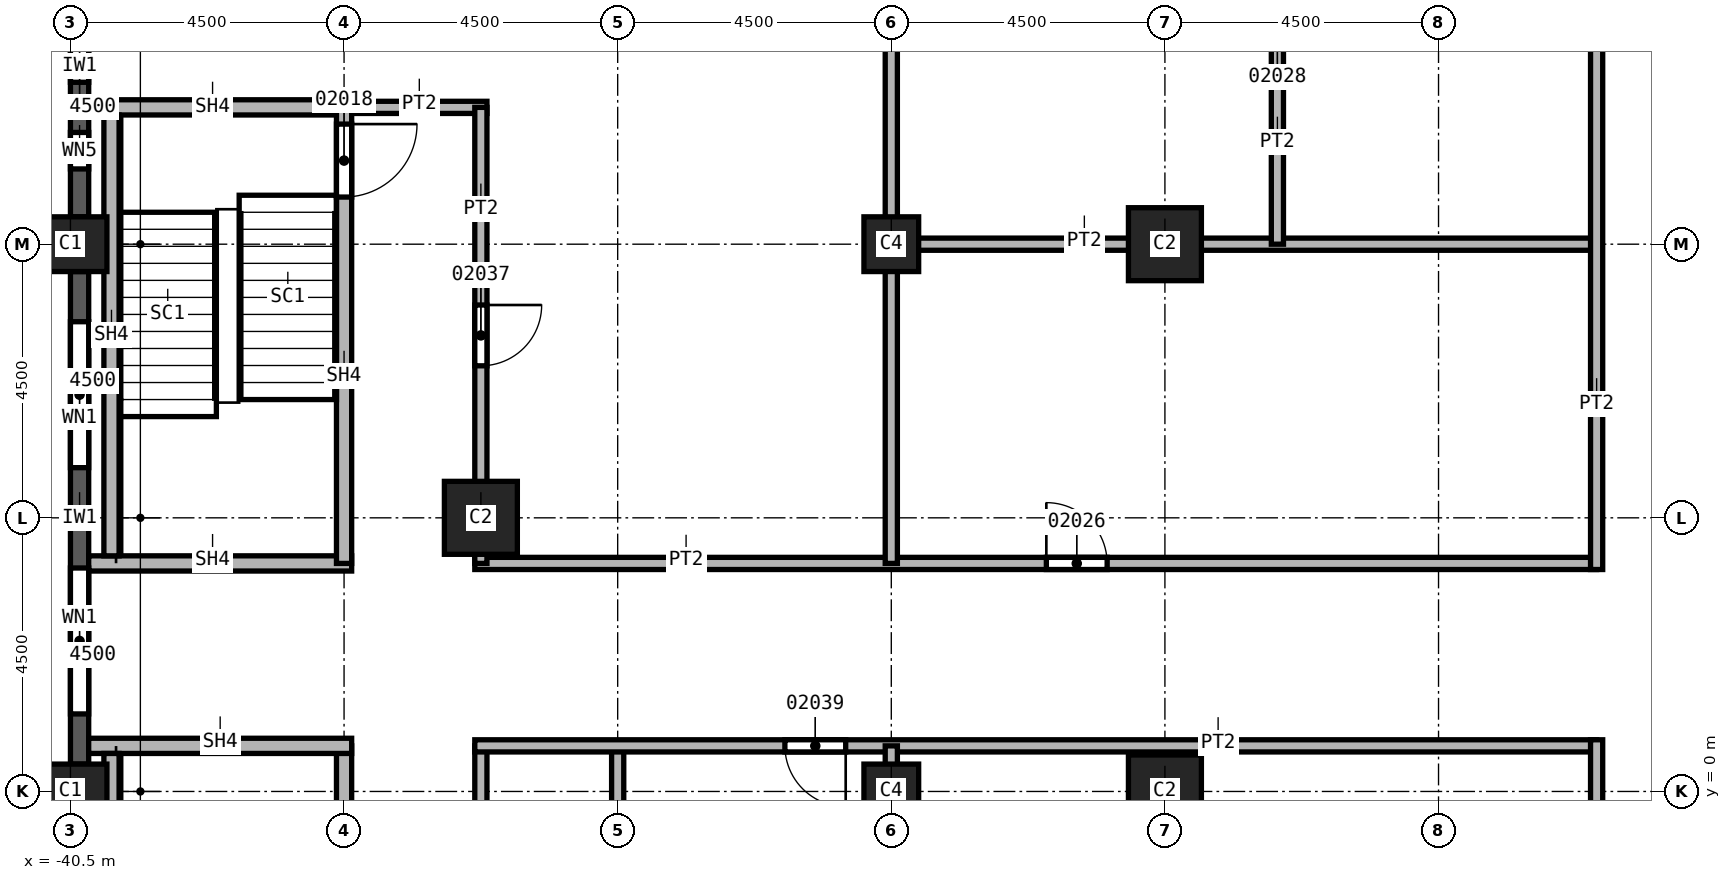
"""IFC4 building model, lengths in metres.
Left out: names, types, materials, properties, quantities, classifications, styles, units other than length and angle.
Written with IfcOpenShell. Run it as: python <this file> out.ifc"""

import sys

from ifc_helpers import new_model, si_unit, direction, frame, frame_2d, origin, origin_2d, place, context, subcontext, project, spatial, rectangle, extrude, element, fill, save


model = new_model("IFC4")
c1 = context("Model", 3, precision=1e-05, world=origin(), true_north=direction((0.0, 1.0)))
c2 = subcontext(c1, "Body", "Model", "MODEL_VIEW")
j1 = project(units=[si_unit("LENGTHUNIT", "METRE"), si_unit("PLANEANGLEUNIT", "RADIAN")], contexts=[c1])
p1 = place(None, origin())
s1 = spatial("IfcSite", under=j1, at=p1, CompositionType="ELEMENT")
p2 = place(p1, origin())
s2 = spatial("IfcBuilding", under=s1, at=p2, CompositionType="ELEMENT")
p3 = place(p2, frame((0.0, 0.0, 80.0)))
s3 = spatial("IfcBuildingStorey", under=s2, at=p3, CompositionType="ELEMENT", Elevation=80.0)
for number, where, z_axis, x_axis in (
    (1, (-40.5, 0.0, 0.0), (0.0, 0.0, 1.0), (0.0, 1.0, 0.0)),
    (2, (-40.5, 9.0, 0.0), (0.0, 0.0, 1.0), (0.0, 1.0, 0.0)),
):
    element("IfcColumn", number, at=place(p3, frame(where, z_axis=z_axis, x_axis=x_axis)), inside=s3, PredefinedType="COLUMN", context=c2, shape_type="SweptSolid", body=[
        extrude(rectangle(XDim=0.9, YDim=1.2, at=origin_2d()), origin(), (0.0, 0.0, 1.0), 3.7),
    ])
for number, where, z_axis, x_axis in (
    (3, (-33.75, 4.5, 0.0), (0.0, 0.0, 1.0), (1.0, 0.0, 0.0)),
    (4, (-22.5, 0.0, 0.0), (0.0, 0.0, 1.0), (1.0, 0.0, 0.0)),
    (5, (-22.5, 9.0, 0.0), (0.0, 0.0, 1.0), (1.0, 0.0, 0.0)),
):
    element("IfcColumn", number, at=place(p3, frame(where, z_axis=z_axis, x_axis=x_axis)), inside=s3, PredefinedType="COLUMN", context=c2, shape_type="SweptSolid", body=[
        extrude(rectangle(XDim=1.2, YDim=1.2, at=origin_2d()), origin(), (0.0, 0.0, 1.0), 3.7),
    ])
for number, where, z_axis, x_axis in (
    (6, (-27.0, 0.0, 0.0), (0.0, 0.0, 1.0), (1.0, 0.0, 0.0)),
    (7, (-27.0, 9.0, 0.0), (0.0, 0.0, 1.0), (1.0, 0.0, 0.0)),
):
    element("IfcColumn", number, at=place(p3, frame(where, z_axis=z_axis, x_axis=x_axis)), inside=s3, PredefinedType="COLUMN", context=c2, shape_type="SweptSolid", body=[
        extrude(rectangle(XDim=0.9, YDim=0.9, at=origin_2d()), origin(), (0.0, 0.0, 1.0), 3.7),
    ])
p4 = place(p3, frame((-40.35, 13.05, 0.0), z_axis=(0.0, 0.0, 1.0), x_axis=(0.0, -1.0, 0.0)))
e8 = element("IfcWall", 8, at=p4, inside=s3, PredefinedType="SOLIDWALL", context=c2, shape_type="SweptSolid", body=[
    extrude(rectangle(XDim=3.6, YDim=0.3, at=frame_2d((1.8, 0.0))), origin(), (0.0, 0.0, 1.0), 3.1),
])
p5 = place(p4, frame((0.788, 0.0, 0.8)))
e9 = element("IfcOpeningElement", 9, at=p5, cuts=e8, PredefinedType="OPENING", context=c2, shape_type="SweptSolid", body=[
    extrude(rectangle(XDim=0.6, YDim=1.95, at=frame_2d((0.3, 0.975))), frame((0.0, 0.15, 0.0), z_axis=(0.0, -1.0, 0.0), x_axis=(1.0, 0.0, 0.0)), (0.0, 0.0, 1.0), 0.3),
])
p6 = place(p4, frame((2.212, 0.0, 0.8)))
e10 = element("IfcOpeningElement", 10, at=p6, cuts=e8, PredefinedType="OPENING", context=c2, shape_type="SweptSolid", body=[
    extrude(rectangle(XDim=0.6, YDim=1.95, at=frame_2d((0.3, 0.975))), frame((0.0, 0.15, 0.0), z_axis=(0.0, -1.0, 0.0), x_axis=(1.0, 0.0, 0.0)), (0.0, 0.0, 1.0), 0.3),
])
p7 = place(p3, frame((-40.35, 8.55, 0.0), z_axis=(0.0, 0.0, 1.0), x_axis=(0.0, -1.0, 0.0)))
e11 = element("IfcWall", 11, at=p7, inside=s3, PredefinedType="SOLIDWALL", context=c2, shape_type="SweptSolid", body=[
    extrude(rectangle(XDim=8.1, YDim=0.3, at=frame_2d((4.05, 0.0))), origin(), (0.0, 0.0, 1.0), 3.1),
])
p8 = place(p7, frame((0.825, 0.0, 0.8)))
e12 = element("IfcOpeningElement", 12, at=p8, cuts=e11, PredefinedType="OPENING", context=c2, shape_type="SweptSolid", body=[
    extrude(rectangle(XDim=2.4, YDim=1.95, at=frame_2d((1.2, 0.975))), frame((0.0, 0.15, 0.0), z_axis=(0.0, -1.0, 0.0), x_axis=(1.0, 0.0, 0.0)), (0.0, 0.0, 1.0), 0.3),
])
p9 = place(p7, frame((4.875, 0.0, 0.8)))
e13 = element("IfcOpeningElement", 13, at=p9, cuts=e11, PredefinedType="OPENING", context=c2, shape_type="SweptSolid", body=[
    extrude(rectangle(XDim=2.4, YDim=1.95, at=frame_2d((1.2, 0.975))), frame((0.0, 0.15, 0.0), z_axis=(0.0, -1.0, 0.0), x_axis=(1.0, 0.0, 0.0)), (0.0, 0.0, 1.0), 0.3),
])
p10 = place(p3, frame((-36.0, 11.25, 0.0), z_axis=(0.0, 0.0, 1.0), x_axis=(1.0, 0.0, 0.0)))
e14 = element("IfcWall", 14, at=p10, inside=s3, PredefinedType="PARTITIONING", context=c2, shape_type="SweptSolid", body=[
    extrude(rectangle(XDim=2.35, YDim=0.2, at=frame_2d((1.175, 0.0))), origin(), (0.0, 0.0, 1.0), 3.7),
])
p11 = place(p3, frame((-33.85, 3.75, 0.0), z_axis=(0.0, 0.0, 1.0), x_axis=(1.0, 0.0, 0.0)))
e15 = element("IfcWall", 15, at=p11, inside=s3, PredefinedType="PARTITIONING", context=c2, shape_type="SweptSolid", body=[
    extrude(rectangle(XDim=18.45, YDim=0.2, at=frame_2d((9.225, 0.0))), origin(), (0.0, 0.0, 1.0), 3.7),
])
p12 = place(p11, frame((9.4, 0.0, 0.0)))
e16 = element("IfcOpeningElement", 16, at=p12, cuts=e15, PredefinedType="OPENING", context=c2, shape_type="SweptSolid", body=[
    extrude(rectangle(XDim=1.0, YDim=2.1, at=frame_2d((0.5, 1.05))), frame((0.0, 0.1, 0.0), z_axis=(0.0, -1.0, 0.0), x_axis=(1.0, 0.0, 0.0)), (0.0, 0.0, 1.0), 0.2),
])
p13 = place(p3, frame((-33.75, 0.75, 0.0), z_axis=(0.0, 0.0, 1.0), x_axis=(0.0, -1.0, 0.0)))
e17 = element("IfcWall", 17, at=p13, inside=s3, PredefinedType="PARTITIONING", context=c2, shape_type="SweptSolid", body=[
    extrude(rectangle(XDim=7.6, YDim=0.2, at=frame_2d((3.8, 0.0))), origin(), (0.0, 0.0, 1.0), 3.7),
])
p14 = place(p13, frame((2.35, 0.0, 0.0)))
e18 = element("IfcOpeningElement", 18, at=p14, cuts=e17, PredefinedType="OPENING", context=c2, shape_type="SweptSolid", body=[
    extrude(rectangle(XDim=1.0, YDim=2.1, at=frame_2d((0.5, 1.05))), frame((0.0, 0.1, 0.0), z_axis=(0.0, -1.0, 0.0), x_axis=(1.0, 0.0, 0.0)), (0.0, 0.0, 1.0), 0.2),
])
p15 = place(p3, frame((-33.75, 11.25, 0.0), z_axis=(0.0, 0.0, 1.0), x_axis=(0.0, -1.0, 0.0)))
e19 = element("IfcWall", 19, at=p15, inside=s3, PredefinedType="PARTITIONING", context=c2, shape_type="SweptSolid", body=[
    extrude(rectangle(XDim=7.5, YDim=0.2, at=frame_2d((3.75, 0.0))), origin(), (0.0, 0.0, 1.0), 3.7),
])
p16 = place(p15, frame((3.25, 0.0, 0.0)))
e20 = element("IfcOpeningElement", 20, at=p16, cuts=e19, PredefinedType="OPENING", context=c2, shape_type="SweptSolid", body=[
    extrude(rectangle(XDim=1.0, YDim=2.1, at=frame_2d((0.5, 1.05))), frame((0.0, 0.1, 0.0), z_axis=(0.0, -1.0, 0.0), x_axis=(1.0, 0.0, 0.0)), (0.0, 0.0, 1.0), 0.2),
])
p17 = place(p3, frame((-31.5, 0.75, 0.0), z_axis=(0.0, 0.0, 1.0), x_axis=(0.0, -1.0, 0.0)))
e21 = element("IfcWall", 21, at=p17, inside=s3, PredefinedType="PARTITIONING", context=c2, shape_type="SweptSolid", body=[
    extrude(rectangle(XDim=18.15, YDim=0.2, at=frame_2d((9.075, 0.0))), origin(), (0.0, 0.0, 1.0), 3.7),
])
p18 = place(p3, frame((-15.4, 0.75, 0.0), z_axis=(0.0, 0.0, 1.0), x_axis=(-1.0, 0.0, 0.0)))
e22 = element("IfcWall", 22, at=p18, inside=s3, PredefinedType="PARTITIONING", context=c2, shape_type="SweptSolid", body=[
    extrude(rectangle(XDim=18.45, YDim=0.2, at=frame_2d((9.225, 0.0))), origin(), (0.0, 0.0, 1.0), 3.7),
])
p19 = place(p18, frame((12.35, 0.0, 0.0)))
e23 = element("IfcOpeningElement", 23, at=p19, cuts=e22, PredefinedType="OPENING", context=c2, shape_type="SweptSolid", body=[
    extrude(rectangle(XDim=1.0, YDim=2.1, at=frame_2d((0.5, 1.05))), frame((0.0, 0.1, 0.0), z_axis=(0.0, -1.0, 0.0), x_axis=(1.0, 0.0, 0.0)), (0.0, 0.0, 1.0), 0.2),
])
p20 = place(p3, frame((-27.1, 9.0, 0.0), z_axis=(0.0, 0.0, 1.0), x_axis=(1.0, 0.0, 0.0)))
e24 = element("IfcWall", 24, at=p20, inside=s3, PredefinedType="PARTITIONING", context=c2, shape_type="SweptSolid", body=[
    extrude(rectangle(XDim=11.7, YDim=0.2, at=frame_2d((5.85, 0.0))), origin(), (0.0, 0.0, 1.0), 3.7),
])
p21 = place(p3, frame((-27.0, -17.4, 0.0), z_axis=(0.0, 0.0, 1.0), x_axis=(0.0, 1.0, 0.0)))
e25 = element("IfcWall", 25, at=p21, inside=s3, PredefinedType="PARTITIONING", context=c2, shape_type="SweptSolid", body=[
    extrude(rectangle(XDim=18.15, YDim=0.2, at=frame_2d((9.075, 0.0))), origin(), (0.0, 0.0, 1.0), 3.7),
])
p22 = place(p3, frame((-27.0, 3.75, 0.0), z_axis=(0.0, 0.0, 1.0), x_axis=(0.0, 1.0, 0.0)))
e26 = element("IfcWall", 26, at=p22, inside=s3, PredefinedType="PARTITIONING", context=c2, shape_type="SweptSolid", body=[
    extrude(rectangle(XDim=13.65, YDim=0.2, at=frame_2d((6.825, 0.0))), origin(), (0.0, 0.0, 1.0), 3.7),
])
p23 = place(p3, frame((-20.65, 9.0, 0.0), z_axis=(0.0, 0.0, 1.0), x_axis=(0.0, 1.0, 0.0)))
e27 = element("IfcWall", 27, at=p23, inside=s3, PredefinedType="PARTITIONING", context=c2, shape_type="SweptSolid", body=[
    extrude(rectangle(XDim=4.5, YDim=0.2, at=frame_2d((2.25, 0.0))), origin(), (0.0, 0.0, 1.0), 3.7),
])
p24 = place(p23, frame((3.25, 0.0, 0.0)))
e28 = element("IfcOpeningElement", 28, at=p24, cuts=e27, PredefinedType="OPENING", context=c2, shape_type="SweptSolid", body=[
    extrude(rectangle(XDim=1.0, YDim=2.1, at=frame_2d((0.5, 1.05))), frame((0.0, 0.1, 0.0), z_axis=(0.0, -1.0, 0.0), x_axis=(1.0, 0.0, 0.0)), (0.0, 0.0, 1.0), 0.2),
])
p25 = place(p3, frame((-15.4, -24.5, 0.0), z_axis=(0.0, 0.0, 1.0), x_axis=(0.0, 1.0, 0.0)))
e29 = element("IfcWall", 29, at=p25, inside=s3, PredefinedType="PARTITIONING", context=c2, shape_type="SweptSolid", body=[
    extrude(rectangle(XDim=25.35, YDim=0.2, at=frame_2d((12.675, 0.0))), origin(), (0.0, 0.0, 1.0), 3.7),
])
p26 = place(p25, frame((2.5, 0.0, 0.0)))
e30 = element("IfcOpeningElement", 30, at=p26, cuts=e29, PredefinedType="OPENING", context=c2, shape_type="SweptSolid", body=[
    extrude(rectangle(XDim=1.0, YDim=2.1, at=frame_2d((0.5, 1.05))), frame((0.0, 0.1, 0.0), z_axis=(0.0, -1.0, 0.0), x_axis=(1.0, 0.0, 0.0)), (0.0, 0.0, 1.0), 0.2),
])
p27 = place(p25, frame((5.875, 0.0, 0.0)))
e31 = element("IfcOpeningElement", 31, at=p27, cuts=e29, PredefinedType="OPENING", context=c2, shape_type="SweptSolid", body=[
    extrude(rectangle(XDim=1.0, YDim=2.1, at=frame_2d((0.5, 1.05))), frame((0.0, 0.1, 0.0), z_axis=(0.0, -1.0, 0.0), x_axis=(1.0, 0.0, 0.0)), (0.0, 0.0, 1.0), 0.2),
])
p28 = place(p25, frame((16.7, 0.0, 0.0)))
e32 = element("IfcOpeningElement", 32, at=p28, cuts=e29, PredefinedType="OPENING", context=c2, shape_type="SweptSolid", body=[
    extrude(rectangle(XDim=1.0, YDim=2.1, at=frame_2d((0.5, 1.05))), frame((0.0, 0.1, 0.0), z_axis=(0.0, -1.0, 0.0), x_axis=(1.0, 0.0, 0.0)), (0.0, 0.0, 1.0), 0.2),
])
p29 = place(p3, frame((-15.4, 3.65, 0.0), z_axis=(0.0, 0.0, 1.0), x_axis=(0.0, 1.0, 0.0)))
e33 = element("IfcWall", 33, at=p29, inside=s3, PredefinedType="PARTITIONING", context=c2, shape_type="SweptSolid", body=[
    extrude(rectangle(XDim=9.95, YDim=0.2, at=frame_2d((4.975, 0.0))), origin(), (0.0, 0.0, 1.0), 3.7),
])
p30 = place(p3, frame((-40.2, 3.75, 0.0), z_axis=(0.0, 0.0, 1.0), x_axis=(1.0, 0.0, 0.0)))
e34 = element("IfcWall", 34, at=p30, inside=s3, PredefinedType="SOLIDWALL", context=c2, shape_type="SweptSolid", body=[
    extrude(rectangle(XDim=4.325, YDim=0.25, at=frame_2d((2.163, 0.0))), origin(), (0.0, 0.0, 1.0), 3.7),
])
p31 = place(p3, frame((-40.2, 11.25, 0.0), z_axis=(0.0, 0.0, 1.0), x_axis=(1.0, 0.0, 0.0)))
e35 = element("IfcWall", 35, at=p31, inside=s3, PredefinedType="SOLIDWALL", context=c2, shape_type="SweptSolid", body=[
    extrude(rectangle(XDim=4.2, YDim=0.25, at=frame_2d((2.1, 0.0))), origin(), (0.0, 0.0, 1.0), 3.7),
])
p32 = place(p3, frame((-36.0, 0.75, 0.0), z_axis=(0.0, 0.0, 1.0), x_axis=(0.0, -1.0, 0.0)))
e36 = element("IfcWall", 36, at=p32, inside=s3, PredefinedType="SOLIDWALL", context=c2, shape_type="SweptSolid", body=[
    extrude(rectangle(XDim=7.625, YDim=0.25, at=frame_2d((3.812, 0.0))), origin(), (0.0, 0.0, 1.0), 3.7),
])
p33 = place(p32, frame((5.95, 0.0, 0.0)))
e37 = element("IfcOpeningElement", 37, at=p33, cuts=e36, PredefinedType="OPENING", context=c2, shape_type="SweptSolid", body=[
    extrude(rectangle(XDim=1.2, YDim=2.1, at=frame_2d((0.6, 1.05))), frame((0.0, 0.125, 0.0), z_axis=(0.0, -1.0, 0.0), x_axis=(1.0, 0.0, 0.0)), (0.0, 0.0, 1.0), 0.25),
])
p34 = place(p3, frame((-36.0, 11.375, 0.0), z_axis=(0.0, 0.0, 1.0), x_axis=(0.0, -1.0, 0.0)))
e38 = element("IfcWall", 38, at=p34, inside=s3, PredefinedType="SOLIDWALL", context=c2, shape_type="SweptSolid", body=[
    extrude(rectangle(XDim=7.625, YDim=0.25, at=frame_2d((3.812, 0.0))), origin(), (0.0, 0.0, 1.0), 3.7),
])
p35 = place(p34, frame((0.4, 0.0, 0.0)))
e39 = element("IfcOpeningElement", 39, at=p35, cuts=e38, PredefinedType="OPENING", context=c2, shape_type="SweptSolid", body=[
    extrude(rectangle(XDim=1.2, YDim=2.1, at=frame_2d((0.6, 1.05))), frame((0.0, 0.125, 0.0), z_axis=(0.0, -1.0, 0.0), x_axis=(1.0, 0.0, 0.0)), (0.0, 0.0, 1.0), 0.25),
])
p36 = place(p3, frame((-35.875, 0.75, 0.0), z_axis=(0.0, 0.0, 1.0), x_axis=(-1.0, 0.0, 0.0)))
e40 = element("IfcWall", 40, at=p36, inside=s3, PredefinedType="SOLIDWALL", context=c2, shape_type="SweptSolid", body=[
    extrude(rectangle(XDim=4.325, YDim=0.25, at=frame_2d((2.163, 0.0))), origin(), (0.0, 0.0, 1.0), 3.7),
])
for number, where, z_axis, x_axis in (
    (41, (-39.825, 3.875, 0.0), (0.0, 0.0, 1.0), (0.0, 1.0, 0.0)),
    (42, (-39.825, -6.625, 0.0), (0.0, 0.0, 1.0), (0.0, 1.0, 0.0)),
):
    element("IfcWall", number, at=place(p3, frame(where, z_axis=z_axis, x_axis=x_axis)), inside=s3, PredefinedType="SOLIDWALL", context=c2, shape_type="SweptSolid", body=[
        extrude(rectangle(XDim=7.25, YDim=0.25, at=frame_2d((3.625, 0.0))), origin(), (0.0, 0.0, 1.0), 3.7),
    ])
p37 = place(p8, origin())
e43 = element("IfcWindow", 43, at=p37, inside=s3, PartitioningType="SINGLE_PANEL", PredefinedType="WINDOW", context=c2, shape_type="SweptSolid", body=[
    extrude(rectangle(XDim=2.4, YDim=1.95, at=frame_2d((1.2, 0.975))), frame((0.0, 0.03, 0.0), z_axis=(0.0, -1.0, 0.0), x_axis=(1.0, 0.0, 0.0)), (0.0, 0.0, 1.0), 0.06),
])
fill(e12, e43)
p38 = place(p9, origin())
e44 = element("IfcWindow", 44, at=p38, inside=s3, PartitioningType="SINGLE_PANEL", PredefinedType="WINDOW", context=c2, shape_type="SweptSolid", body=[
    extrude(rectangle(XDim=2.4, YDim=1.95, at=frame_2d((1.2, 0.975))), frame((0.0, 0.03, 0.0), z_axis=(0.0, -1.0, 0.0), x_axis=(1.0, 0.0, 0.0)), (0.0, 0.0, 1.0), 0.06),
])
fill(e13, e44)
p39 = place(p35, origin())
e45 = element("IfcDoor", 45, at=p39, inside=s3, OperationType="SINGLE_SWING_LEFT", PredefinedType="DOOR", context=c2, shape_type="SweptSolid", body=[
    extrude(rectangle(XDim=1.2, YDim=2.1, at=frame_2d((0.6, 1.05))), frame((0.0, 0.025, 0.0), z_axis=(0.0, -1.0, 0.0), x_axis=(1.0, 0.0, 0.0)), (0.0, 0.0, 1.0), 0.05),
])
fill(e39, e45)
p40 = place(p12, origin())
e46 = element("IfcDoor", 46, at=p40, inside=s3, OperationType="SINGLE_SWING_LEFT", PredefinedType="DOOR", context=c2, shape_type="SweptSolid", body=[
    extrude(rectangle(XDim=1.0, YDim=2.1, at=frame_2d((0.5, 1.05))), frame((0.0, 0.025, 0.0), z_axis=(0.0, -1.0, 0.0), x_axis=(1.0, 0.0, 0.0)), (0.0, 0.0, 1.0), 0.05),
])
fill(e16, e46)
p41 = place(p16, origin())
e47 = element("IfcDoor", 47, at=p41, inside=s3, OperationType="SINGLE_SWING_RIGHT", PredefinedType="DOOR", context=c2, shape_type="SweptSolid", body=[
    extrude(rectangle(XDim=1.0, YDim=2.1, at=frame_2d((0.5, 1.05))), frame((0.0, 0.025, 0.0), z_axis=(0.0, -1.0, 0.0), x_axis=(1.0, 0.0, 0.0)), (0.0, 0.0, 1.0), 0.05),
])
fill(e20, e47)
p42 = place(p19, origin())
e48 = element("IfcDoor", 48, at=p42, inside=s3, OperationType="SINGLE_SWING_RIGHT", PredefinedType="DOOR", context=c2, shape_type="SweptSolid", body=[
    extrude(rectangle(XDim=1.0, YDim=2.1, at=frame_2d((0.5, 1.05))), frame((0.0, 0.025, 0.0), z_axis=(0.0, -1.0, 0.0), x_axis=(1.0, 0.0, 0.0)), (0.0, 0.0, 1.0), 0.05),
])
fill(e23, e48)
p43 = place(p5, origin())
e49 = element("IfcWindow", 49, at=p43, inside=s3, PartitioningType="SINGLE_PANEL", PredefinedType="WINDOW", context=c2, shape_type="SweptSolid", body=[
    extrude(rectangle(XDim=0.6, YDim=1.95, at=frame_2d((0.3, 0.975))), frame((0.0, 0.03, 0.0), z_axis=(0.0, -1.0, 0.0), x_axis=(1.0, 0.0, 0.0)), (0.0, 0.0, 1.0), 0.06),
])
fill(e9, e49)
p44 = place(p6, origin())
e50 = element("IfcWindow", 50, at=p44, inside=s3, PartitioningType="SINGLE_PANEL", PredefinedType="WINDOW", context=c2, shape_type="SweptSolid", body=[
    extrude(rectangle(XDim=0.6, YDim=1.95, at=frame_2d((0.3, 0.975))), frame((0.0, 0.03, 0.0), z_axis=(0.0, -1.0, 0.0), x_axis=(1.0, 0.0, 0.0)), (0.0, 0.0, 1.0), 0.06),
])
fill(e10, e50)
save(model, sys.argv[1])
